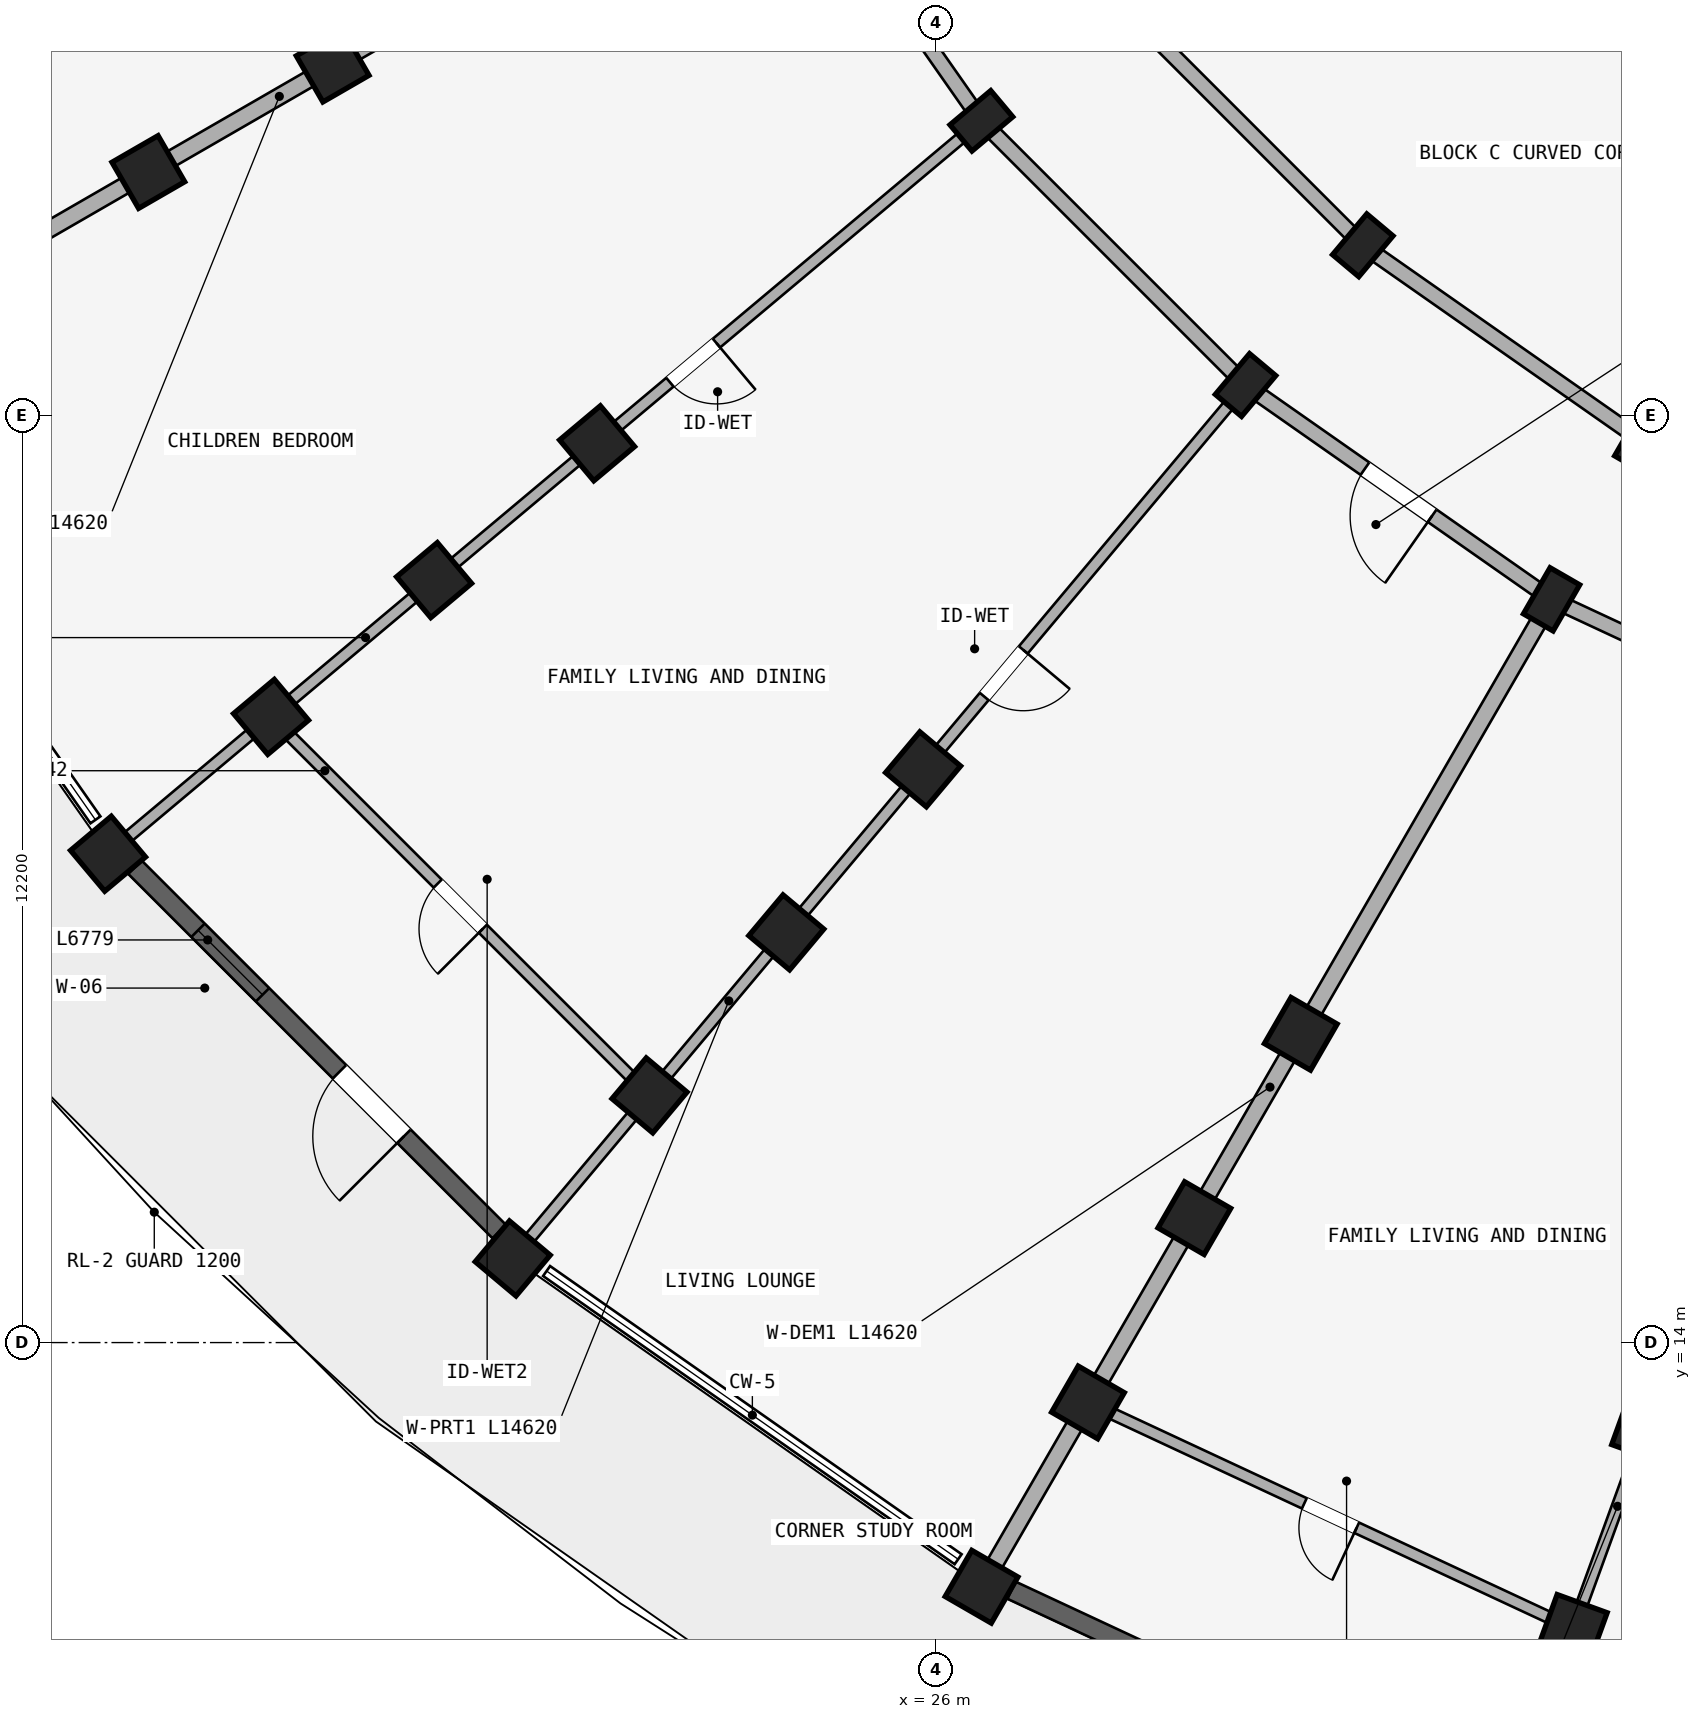
"""IFC4 building model, lengths in metres.
Left out: names, types, materials, properties, quantities, classifications, styles, units other than length and angle.
Written with IfcOpenShell. Run it as: python <this file> out.ifc"""

import sys

from ifc_helpers import new_model, si_unit, direction, frame, frame_2d, origin, origin_2d, place, context, subcontext, project, spatial, rectangle, extrude, element, fill, save


model = new_model("IFC4")
c1 = context("Model", 3, precision=1e-05, world=origin(), true_north=direction((0.0, 1.0)))
c2 = subcontext(c1, "Body", "Model", "MODEL_VIEW")
j1 = project(units=[si_unit("LENGTHUNIT", "METRE"), si_unit("PLANEANGLEUNIT", "RADIAN")], contexts=[c1])
p1 = place(None, origin())
s1 = spatial("IfcSite", under=j1, at=p1, CompositionType="ELEMENT")
p2 = place(p1, origin())
s2 = spatial("IfcBuilding", under=s1, at=p2, CompositionType="ELEMENT")
p3 = place(p2, frame((0.0, 0.0, 21.3)))
s3 = spatial("IfcBuildingStorey", under=s2, at=p3, CompositionType="ELEMENT", Elevation=21.3)
for number, where, z_axis, x_axis in (
    (1, (35.34, 12.868, 0.0), (0.0, 0.0, 1.0), (-0.94, 0.342, 0.0)),
    (2, (34.382, 10.236, 0.0), (0.0, 0.0, 1.0), (-0.94, 0.342, 0.0)),
):
    element("IfcColumn", number, at=place(p3, frame(where, z_axis=z_axis, x_axis=x_axis)), inside=s3, PredefinedType="COLUMN", context=c2, shape_type="SweptSolid", body=[
        extrude(rectangle(XDim=0.7, YDim=0.7, at=origin_2d()), origin(), (0.0, 0.0, 1.0), 2.93),
    ])
for number, where, z_axis, x_axis in (
    (3, (35.3, 25.856, 0.0), (0.0, 0.0, 1.0), (-0.866, 0.5, 0.0)),
    (4, (34.1, 23.778, 0.0), (0.0, 0.0, 1.0), (-0.866, 0.5, 0.0)),
):
    element("IfcColumn", number, at=place(p3, frame(where, z_axis=z_axis, x_axis=x_axis)), inside=s3, PredefinedType="COLUMN", context=c2, shape_type="SweptSolid", body=[
        extrude(rectangle(XDim=0.45, YDim=0.7, at=origin_2d()), origin(), (0.0, 0.0, 1.0), 2.93),
    ])
for number, where, z_axis, x_axis in (
    (5, (30.8, 18.062, 0.0), (0.0, 0.0, 1.0), (-0.866, 0.5, 0.0)),
    (6, (29.4, 15.637, 0.0), (0.0, 0.0, 1.0), (-0.866, 0.5, 0.0)),
    (7, (28.0, 13.213, 0.0), (0.0, 0.0, 1.0), (-0.866, 0.5, 0.0)),
):
    element("IfcColumn", number, at=place(p3, frame(where, z_axis=z_axis, x_axis=x_axis)), inside=s3, PredefinedType="COLUMN", context=c2, shape_type="SweptSolid", body=[
        extrude(rectangle(XDim=0.7, YDim=0.7, at=origin_2d()), origin(), (0.0, 0.0, 1.0), 2.93),
    ])
p4 = place(p3, frame((26.6, 10.788, 0.0), z_axis=(0.0, 0.0, 1.0), x_axis=(-0.866025403784, 0.5, 0.0)))
e8 = element("IfcColumn", 8, at=p4, inside=s3, PredefinedType="COLUMN", context=c2, shape_type="SweptSolid", body=[
    extrude(rectangle(XDim=0.7, YDim=0.7, at=origin_2d()), origin(), (0.0, 0.0, 1.0), 2.97),
])
for number, where, z_axis, x_axis in (
    (9, (31.616, 28.436, 0.0), (0.0, 0.0, 1.0), (-0.766, 0.643, 0.0)),
    (10, (30.073, 26.598, 0.0), (0.0, 0.0, 1.0), (-0.766, 0.643, 0.0)),
):
    element("IfcColumn", number, at=place(p3, frame(where, z_axis=z_axis, x_axis=x_axis)), inside=s3, PredefinedType="COLUMN", context=c2, shape_type="SweptSolid", body=[
        extrude(rectangle(XDim=0.45, YDim=0.7, at=origin_2d()), origin(), (0.0, 0.0, 1.0), 2.93),
    ])
for number, where, z_axis, x_axis in (
    (11, (25.831, 21.542, 0.0), (0.0, 0.0, 1.0), (-0.766, 0.643, 0.0)),
    (12, (24.031, 19.397, 0.0), (0.0, 0.0, 1.0), (-0.766, 0.643, 0.0)),
    (13, (22.231, 17.252, 0.0), (0.0, 0.0, 1.0), (-0.766, 0.643, 0.0)),
):
    element("IfcColumn", number, at=place(p3, frame(where, z_axis=z_axis, x_axis=x_axis)), inside=s3, PredefinedType="COLUMN", context=c2, shape_type="SweptSolid", body=[
        extrude(rectangle(XDim=0.7, YDim=0.7, at=origin_2d()), origin(), (0.0, 0.0, 1.0), 2.93),
    ])
p5 = place(p3, frame((20.432, 15.107, 0.0), z_axis=(0.0, 0.0, 1.0), x_axis=(-0.766044443119, 0.642787609687, 0.0)))
e14 = element("IfcColumn", 14, at=p5, inside=s3, PredefinedType="COLUMN", context=c2, shape_type="SweptSolid", body=[
    extrude(rectangle(XDim=0.7, YDim=0.7, at=origin_2d()), origin(), (0.0, 0.0, 1.0), 2.97),
])
p6 = place(p3, frame((26.598, 30.073, 0.0), z_axis=(0.0, 0.0, 1.0), x_axis=(-0.642787609687, 0.766044443119, 0.0)))
e15 = element("IfcColumn", 15, at=p6, inside=s3, PredefinedType="COLUMN", context=c2, shape_type="SweptSolid", body=[
    extrude(rectangle(XDim=0.45, YDim=0.7, at=origin_2d()), origin(), (0.0, 0.0, 1.0), 2.93),
])
for number, where, z_axis, x_axis in (
    (16, (21.542, 25.831, 0.0), (0.0, 0.0, 1.0), (-0.643, 0.766, 0.0)),
    (17, (19.397, 24.031, 0.0), (0.0, 0.0, 1.0), (-0.643, 0.766, 0.0)),
    (18, (17.252, 22.231, 0.0), (0.0, 0.0, 1.0), (-0.643, 0.766, 0.0)),
):
    element("IfcColumn", number, at=place(p3, frame(where, z_axis=z_axis, x_axis=x_axis)), inside=s3, PredefinedType="COLUMN", context=c2, shape_type="SweptSolid", body=[
        extrude(rectangle(XDim=0.7, YDim=0.7, at=origin_2d()), origin(), (0.0, 0.0, 1.0), 2.93),
    ])
p7 = place(p3, frame((15.107, 20.432, 0.0), z_axis=(0.0, 0.0, 1.0), x_axis=(-0.642787609687, 0.766044443119, 0.0)))
e19 = element("IfcColumn", 19, at=p7, inside=s3, PredefinedType="COLUMN", context=c2, shape_type="SweptSolid", body=[
    extrude(rectangle(XDim=0.7, YDim=0.7, at=origin_2d()), origin(), (0.0, 0.0, 1.0), 2.97),
])
for number, where, z_axis, x_axis in (
    (20, (18.062, 30.8, 0.0), (0.0, 0.0, 1.0), (-0.5, 0.866, 0.0)),
    (21, (15.637, 29.4, 0.0), (0.0, 0.0, 1.0), (-0.5, 0.866, 0.0)),
):
    element("IfcColumn", number, at=place(p3, frame(where, z_axis=z_axis, x_axis=x_axis)), inside=s3, PredefinedType="COLUMN", context=c2, shape_type="SweptSolid", body=[
        extrude(rectangle(XDim=0.7, YDim=0.7, at=origin_2d()), origin(), (0.0, 0.0, 1.0), 2.93),
    ])
p8 = place(p3, frame((38.555, 21.701, 0.0), z_axis=(0.0, 0.0, 1.0), x_axis=(-0.906302381024, 0.422629854778, 0.0)))
e22 = element("IfcWall", 22, at=p8, inside=s3, PredefinedType="STANDARD", context=c2, shape_type="SweptSolid", body=[
    extrude(rectangle(XDim=4.915, YDim=0.2, at=frame_2d((2.458, 0.0))), origin(), (0.0, 0.0, 1.0), 2.372),
])
p9 = place(p3, frame((35.3, 25.856, 0.0), z_axis=(0.0, 0.0, 1.0), x_axis=(-0.819155404658, 0.573571637217, 0.0)))
e23 = element("IfcWall", 23, at=p9, inside=s3, PredefinedType="STANDARD", context=c2, shape_type="SweptSolid", body=[
    extrude(rectangle(XDim=4.497, YDim=0.2, at=frame_2d((2.249, 0.0))), origin(), (0.0, 0.0, 1.0), 2.372),
])
p10 = place(p3, frame((34.1, 23.778, 0.0), z_axis=(0.0, 0.0, 1.0), x_axis=(-0.819140911474, 0.573592335331, 0.0)))
e24 = element("IfcWall", 24, at=p10, inside=s3, PredefinedType="STANDARD", context=c2, shape_type="SweptSolid", body=[
    extrude(rectangle(XDim=4.916, YDim=0.2, at=frame_2d((2.458, 0.0))), origin(), (0.0, 0.0, 1.0), 2.372),
])
p11 = place(p10, frame((1.918, 0.0, 0.0)))
e25 = element("IfcOpeningElement", 25, at=p11, cuts=e24, PredefinedType="OPENING", context=c2, shape_type="SweptSolid", body=[
    extrude(rectangle(XDim=1.08, YDim=2.15, at=frame_2d((0.54, 1.075))), frame((0.0, 0.11, 0.0), z_axis=(0.0, -1.0, 0.0), x_axis=(1.0, 0.0, 0.0)), (0.0, 0.0, 1.0), 0.22),
])
p12 = place(p3, frame((31.616, 28.436, 0.0), z_axis=(0.0, 0.0, 1.0), x_axis=(-0.707106781187, 0.707106781187, 0.0)))
e26 = element("IfcWall", 26, at=p12, inside=s3, PredefinedType="STANDARD", context=c2, shape_type="SweptSolid", body=[
    extrude(rectangle(XDim=4.497, YDim=0.2, at=frame_2d((2.249, 0.0))), origin(), (0.0, 0.0, 1.0), 2.372),
])
p13 = place(p3, frame((30.073, 26.598, 0.0), z_axis=(0.0, 0.0, 1.0), x_axis=(-0.707106781187, 0.707106781187, 0.0)))
e27 = element("IfcWall", 27, at=p13, inside=s3, PredefinedType="STANDARD", context=c2, shape_type="SweptSolid", body=[
    extrude(rectangle(XDim=4.916, YDim=0.2, at=frame_2d((2.458, 0.0))), origin(), (0.0, 0.0, 1.0), 2.372),
])
p14 = place(p3, frame((26.598, 30.073, 0.0), z_axis=(0.0, 0.0, 1.0), x_axis=(-0.573592335331, 0.819140911474, 0.0)))
e28 = element("IfcWall", 28, at=p14, inside=s3, PredefinedType="STANDARD", context=c2, shape_type="SweptSolid", body=[
    extrude(rectangle(XDim=4.916, YDim=0.2, at=frame_2d((2.458, 0.0))), origin(), (0.0, 0.0, 1.0), 2.372),
])
p15 = place(p3, frame((38.521, 21.607, 0.0), z_axis=(0.0, 0.0, 1.0), x_axis=(-0.342015232663, -0.939694408106, 0.0)))
e29 = element("IfcWall", 29, at=p15, inside=s3, PredefinedType="PARTITIONING", context=c2, shape_type="SweptSolid", body=[
    extrude(rectangle(XDim=14.62, YDim=0.15, at=frame_2d((7.31, 0.0))), origin(), (0.0, 0.0, 1.0), 2.372),
])
p16 = place(p15, frame((4.449, 0.0, 0.0)))
e30 = element("IfcOpeningElement", 30, at=p16, cuts=e29, PredefinedType="OPENING", context=c2, shape_type="SweptSolid", body=[
    extrude(rectangle(XDim=0.8, YDim=2.1, at=frame_2d((0.4, 1.05))), frame((0.0, 0.085, 0.0), z_axis=(0.0, -1.0, 0.0), x_axis=(1.0, 0.0, 0.0)), (0.0, 0.0, 1.0), 0.17),
])
p17 = place(p3, frame((34.05, 23.691, 0.0), z_axis=(0.0, 0.0, 1.0), x_axis=(-0.500007702989, -0.866020956416, 0.0)))
e31 = element("IfcWall", 31, at=p17, inside=s3, PredefinedType="STANDARD", context=c2, shape_type="SweptSolid", body=[
    extrude(rectangle(XDim=14.62, YDim=0.22, at=frame_2d((7.31, 0.0))), origin(), (0.0, 0.0, 1.0), 2.372),
])
p18 = place(p3, frame((30.009, 26.521, 0.0), z_axis=(0.0, 0.0, 1.0), x_axis=(-0.642779216656, -0.76605148563, 0.0)))
e32 = element("IfcWall", 32, at=p18, inside=s3, PredefinedType="PARTITIONING", context=c2, shape_type="SweptSolid", body=[
    extrude(rectangle(XDim=14.62, YDim=0.15, at=frame_2d((7.31, 0.0))), origin(), (0.0, 0.0, 1.0), 2.372),
])
p19 = place(p18, frame((4.449, 0.0, 0.0)))
e33 = element("IfcOpeningElement", 33, at=p19, cuts=e32, PredefinedType="OPENING", context=c2, shape_type="SweptSolid", body=[
    extrude(rectangle(XDim=0.8, YDim=2.1, at=frame_2d((0.4, 1.05))), frame((0.0, 0.085, 0.0), z_axis=(0.0, -1.0, 0.0), x_axis=(1.0, 0.0, 0.0)), (0.0, 0.0, 1.0), 0.17),
])
p20 = place(p3, frame((26.521, 30.009, 0.0), z_axis=(0.0, 0.0, 1.0), x_axis=(-0.76605148563, -0.642779216656, 0.0)))
e34 = element("IfcWall", 34, at=p20, inside=s3, PredefinedType="PARTITIONING", context=c2, shape_type="SweptSolid", body=[
    extrude(rectangle(XDim=14.62, YDim=0.15, at=frame_2d((7.31, 0.0))), origin(), (0.0, 0.0, 1.0), 2.372),
])
p21 = place(p20, frame((4.449, 0.0, 0.0)))
e35 = element("IfcOpeningElement", 35, at=p21, cuts=e34, PredefinedType="OPENING", context=c2, shape_type="SweptSolid", body=[
    extrude(rectangle(XDim=0.8, YDim=2.1, at=frame_2d((0.4, 1.05))), frame((0.0, 0.085, 0.0), z_axis=(0.0, -1.0, 0.0), x_axis=(1.0, 0.0, 0.0)), (0.0, 0.0, 1.0), 0.17),
])
p22 = place(p3, frame((23.691, 34.05, 0.0), z_axis=(0.0, 0.0, 1.0), x_axis=(-0.866020956416, -0.500007702989, 0.0)))
e36 = element("IfcWall", 36, at=p22, inside=s3, PredefinedType="STANDARD", context=c2, shape_type="SweptSolid", body=[
    extrude(rectangle(XDim=14.62, YDim=0.22, at=frame_2d((7.31, 0.0))), origin(), (0.0, 0.0, 1.0), 2.372),
])
p23 = place(p3, frame((34.382, 10.236, 0.0), z_axis=(0.0, 0.0, 1.0), x_axis=(-0.906297360311, 0.422640621205, 0.0)))
e37 = element("IfcWall", 37, at=p23, inside=s3, PredefinedType="PLUMBINGWALL", context=c2, shape_type="SweptSolid", body=[
    extrude(rectangle(XDim=7.042, YDim=0.15, at=frame_2d((3.521, 0.0))), origin(), (0.0, 0.0, 1.0), 2.372),
])
p24 = place(p23, frame((3.141, 0.0, 0.0)))
e38 = element("IfcOpeningElement", 38, at=p24, cuts=e37, PredefinedType="OPENING", context=c2, shape_type="SweptSolid", body=[
    extrude(rectangle(XDim=0.76, YDim=2.05, at=frame_2d((0.38, 1.025))), frame((0.0, 0.085, 0.0), z_axis=(0.0, -1.0, 0.0), x_axis=(1.0, 0.0, 0.0)), (0.0, 0.0, 1.0), 0.17),
])
p25 = place(p3, frame((22.231, 17.252, 0.0), z_axis=(0.0, 0.0, 1.0), x_axis=(-0.707106781187, 0.707106781187, 0.0)))
e39 = element("IfcWall", 39, at=p25, inside=s3, PredefinedType="PLUMBINGWALL", context=c2, shape_type="SweptSolid", body=[
    extrude(rectangle(XDim=7.042, YDim=0.15, at=frame_2d((3.521, 0.0))), origin(), (0.0, 0.0, 1.0), 2.372),
])
p26 = place(p25, frame((3.101, 0.0, 0.0)))
e40 = element("IfcOpeningElement", 40, at=p26, cuts=e39, PredefinedType="OPENING", context=c2, shape_type="SweptSolid", body=[
    extrude(rectangle(XDim=0.84, YDim=2.1, at=frame_2d((0.42, 1.05))), frame((0.0, 0.085, 0.0), z_axis=(0.0, -1.0, 0.0), x_axis=(1.0, 0.0, 0.0)), (0.0, 0.0, 1.0), 0.17),
])
p27 = place(p3, frame((33.137, 7.877, 0.0), z_axis=(0.0, 0.0, 1.0), x_axis=(-0.906310075746, 0.422613353553, 0.0)))
e41 = element("IfcWall", 41, at=p27, inside=s3, PredefinedType="STANDARD", context=c2, shape_type="SweptSolid", body=[
    extrude(rectangle(XDim=6.779, YDim=0.25, at=frame_2d((3.389, 0.0))), origin(), (0.0, 0.0, 1.0), 2.48),
])
p28 = place(p27, frame((2.489, 0.0, 0.63)))
e42 = element("IfcOpeningElement", 42, at=p28, cuts=e41, PredefinedType="OPENING", context=c2, shape_type="SweptSolid", body=[
    extrude(rectangle(XDim=1.8, YDim=1.65, at=frame_2d((0.9, 0.825))), frame((0.0, 0.135, 0.0), z_axis=(0.0, -1.0, 0.0), x_axis=(1.0, 0.0, 0.0)), (0.0, 0.0, 1.0), 0.27),
])
p29 = place(p3, frame((20.254, 15.461, 0.0), z_axis=(0.0, 0.0, 1.0), x_axis=(-0.707106781187, 0.707106781187, 0.0)))
e43 = element("IfcWall", 43, at=p29, inside=s3, PredefinedType="STANDARD", context=c2, shape_type="SweptSolid", body=[
    extrude(rectangle(XDim=6.779, YDim=0.25, at=frame_2d((3.389, 0.0))), origin(), (0.0, 0.0, 1.0), 2.48),
])
p30 = place(p29, frame((4.405, 0.0, 0.53)))
e44 = element("IfcOpeningElement", 44, at=p30, cuts=e43, PredefinedType="OPENING", context=c2, shape_type="SweptSolid", body=[
    extrude(rectangle(XDim=1.2, YDim=1.5, at=frame_2d((0.6, 0.75))), frame((0.0, 0.135, 0.0), z_axis=(0.0, -1.0, 0.0), x_axis=(1.0, 0.0, 0.0)), (0.0, 0.0, 1.0), 0.27),
])
p31 = place(p29, frame((1.772, 0.0, 0.0)))
e45 = element("IfcOpeningElement", 45, at=p31, cuts=e43, PredefinedType="OPENING", context=c2, shape_type="SweptSolid", body=[
    extrude(rectangle(XDim=1.2, YDim=2.15, at=frame_2d((0.6, 1.075))), frame((0.0, 0.135, 0.0), z_axis=(0.0, -1.0, 0.0), x_axis=(1.0, 0.0, 0.0)), (0.0, 0.0, 1.0), 0.27),
])
p32 = place(p30, origin())
e46 = element("IfcWindow", 46, at=p32, inside=s3, PartitioningType="SINGLE_PANEL", PredefinedType="WINDOW", context=c2, shape_type="SweptSolid", body=[
    extrude(rectangle(XDim=1.2, YDim=1.5, at=frame_2d((0.6, 0.75))), frame((0.0, 0.03, 0.0), z_axis=(0.0, -1.0, 0.0), x_axis=(1.0, 0.0, 0.0)), (0.0, 0.0, 1.0), 0.06),
])
fill(e44, e46)
p33 = place(p19, origin())
e47 = element("IfcDoor", 47, at=p33, inside=s3, OperationType="SINGLE_SWING_LEFT", PredefinedType="DOOR", context=c2, shape_type="SweptSolid", body=[
    extrude(rectangle(XDim=0.8, YDim=2.1, at=frame_2d((0.4, 1.05))), frame((0.0, 0.025, 0.0), z_axis=(0.0, -1.0, 0.0), x_axis=(1.0, 0.0, 0.0)), (0.0, 0.0, 1.0), 0.05),
])
fill(e33, e47)
p34 = place(p21, frame((0.8, 0.0, 0.0), z_axis=(0.0, 0.0, 1.0), x_axis=(-1.0, 0.0, 0.0)))
e48 = element("IfcDoor", 48, at=p34, inside=s3, OperationType="SINGLE_SWING_RIGHT", PredefinedType="DOOR", context=c2, shape_type="SweptSolid", body=[
    extrude(rectangle(XDim=0.8, YDim=2.1, at=frame_2d((0.4, 1.05))), frame((0.0, 0.025, 0.0), z_axis=(0.0, -1.0, 0.0), x_axis=(1.0, 0.0, 0.0)), (0.0, 0.0, 1.0), 0.05),
])
fill(e35, e48)
p35 = place(p24, origin())
e49 = element("IfcDoor", 49, at=p35, inside=s3, OperationType="SINGLE_SWING_LEFT", PredefinedType="DOOR", context=c2, shape_type="SweptSolid", body=[
    extrude(rectangle(XDim=0.76, YDim=2.05, at=frame_2d((0.38, 1.025))), frame((0.0, 0.025, 0.0), z_axis=(0.0, -1.0, 0.0), x_axis=(1.0, 0.0, 0.0)), (0.0, 0.0, 1.0), 0.05),
])
fill(e38, e49)
p36 = place(p11, frame((1.08, 0.0, 0.0), z_axis=(0.0, 0.0, 1.0), x_axis=(-1.0, 0.0, 0.0)))
e50 = element("IfcDoor", 50, at=p36, inside=s3, OperationType="SINGLE_SWING_RIGHT", PredefinedType="DOOR", context=c2, shape_type="SweptSolid", body=[
    extrude(rectangle(XDim=1.08, YDim=2.15, at=frame_2d((0.54, 1.075))), frame((0.0, 0.025, 0.0), z_axis=(0.0, -1.0, 0.0), x_axis=(1.0, 0.0, 0.0)), (0.0, 0.0, 1.0), 0.05),
])
fill(e25, e50)
p37 = place(p26, origin())
e51 = element("IfcDoor", 51, at=p37, inside=s3, OperationType="SINGLE_SWING_LEFT", PredefinedType="DOOR", context=c2, shape_type="SweptSolid", body=[
    extrude(rectangle(XDim=0.84, YDim=2.1, at=frame_2d((0.42, 1.05))), frame((0.0, 0.025, 0.0), z_axis=(0.0, -1.0, 0.0), x_axis=(1.0, 0.0, 0.0)), (0.0, 0.0, 1.0), 0.05),
])
fill(e40, e51)
p38 = place(p31, origin())
e52 = element("IfcDoor", 52, at=p38, inside=s3, OperationType="SINGLE_SWING_LEFT", PredefinedType="DOOR", context=c2, shape_type="SweptSolid", body=[
    extrude(rectangle(XDim=1.2, YDim=2.15, at=frame_2d((0.6, 1.075))), frame((0.0, 0.025, 0.0), z_axis=(0.0, -1.0, 0.0), x_axis=(1.0, 0.0, 0.0)), (0.0, 0.0, 1.0), 0.05),
])
fill(e45, e52)
save(model, sys.argv[1])
